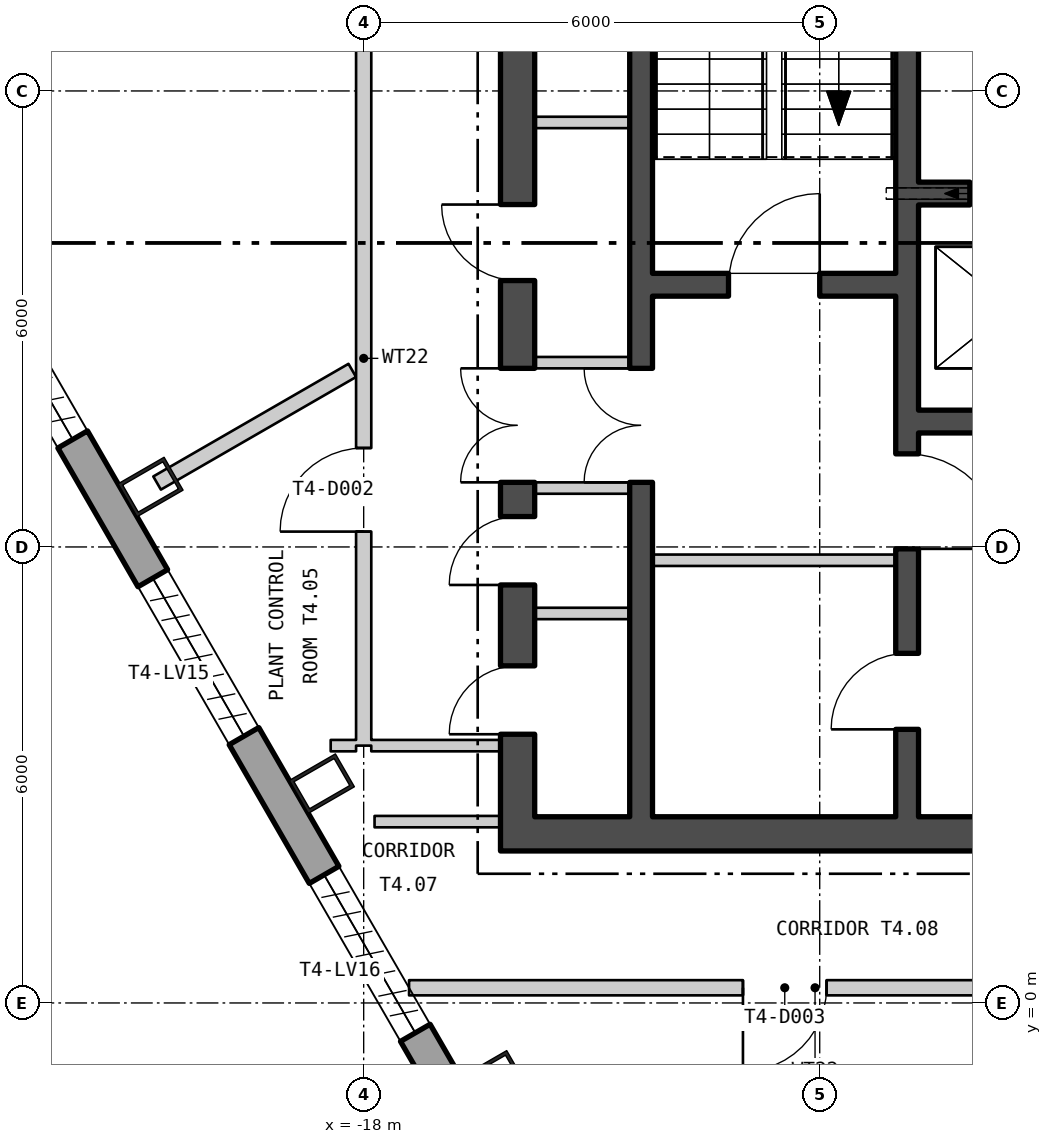
"""IFC4 building model, lengths in metres.
Left out: names, types, materials, properties, quantities, classifications, styles, units other than length and angle.
Written with IfcOpenShell. Run it as: python <this file> out.ifc"""

import sys

from ifc_helpers import new_model, si_unit, direction, frame, frame_2d, origin, origin_2d, place, context, subcontext, project, spatial, polyline, rectangle, hollow_rectangle, outline, extrude, element, fill, save


model = new_model("IFC4")
c1 = context("Model", 3, precision=1e-05, world=origin(), true_north=direction((0.0, 1.0)))
c2 = subcontext(c1, "Body", "Model", "MODEL_VIEW")
j1 = project(units=[si_unit("LENGTHUNIT", "METRE"), si_unit("PLANEANGLEUNIT", "RADIAN")], contexts=[c1])
p1 = place(None, origin())
s1 = spatial("IfcSite", under=j1, at=p1, CompositionType="ELEMENT")
p2 = place(p1, origin())
s2 = spatial("IfcBuilding", under=s1, at=p2, CompositionType="ELEMENT")
p3 = place(p2, frame((0.0, 0.0, 239.4)))
s3 = spatial("IfcBuildingStorey", under=s2, at=p3, CompositionType="ELEMENT", Elevation=239.4)
for number, where, z_axis, x_axis in (
    (1, (-20.804, 6.789, 0.0), (0.0, 0.0, 1.0), (0.5, -0.866, 0.0)),
    (2, (-18.55, 2.886, 0.0), (0.0, 0.0, 1.0), (0.5, -0.866, 0.0)),
    (3, (-16.296, -1.018, 0.0), (0.0, 0.0, 1.0), (0.5, -0.866, 0.0)),
):
    element("IfcColumn", number, at=place(p3, frame(where, z_axis=z_axis, x_axis=x_axis)), inside=s3, PredefinedType="COLUMN", context=c2, shape_type="SweptSolid", body=[
        extrude(hollow_rectangle(XDim=0.5, YDim=0.7, WallThickness=0.045, at=origin_2d()), origin(), (0.0, 0.0, 1.0), 6.0),
    ])
p4 = place(p3, frame((-25.975, 14.597, -0.18), z_axis=(0.0, 0.0, 1.0), x_axis=(0.499999764979, -0.866025539474, 0.0)))
e4 = element("IfcWall", 4, at=p4, inside=s3, PredefinedType="SOLIDWALL", context=c2, shape_type="SweptSolid", body=[
    extrude(outline(polyline([(-0.13, -0.225), (45.87, -0.225), (45.61, 0.225), (0.13, 0.225), (-0.13, -0.225)])), origin(), (0.0, 0.0, 1.0), 6.0),
])
p5 = place(p4, frame((1.424, 0.0, 1.38)))
e5 = element("IfcOpeningElement", 5, at=p5, cuts=e4, PredefinedType="OPENING", context=c2, shape_type="SweptSolid", body=[
    extrude(rectangle(XDim=2.4, YDim=3.6, at=frame_2d((1.2, 1.8))), frame((0.0, 0.235, 0.0), z_axis=(0.0, -1.0, 0.0), x_axis=(1.0, 0.0, 0.0)), (0.0, 0.0, 1.0), 0.47),
])
p6 = place(p4, frame((5.893, 0.0, 1.38)))
e6 = element("IfcOpeningElement", 6, at=p6, cuts=e4, PredefinedType="OPENING", context=c2, shape_type="SweptSolid", body=[
    extrude(rectangle(XDim=2.4, YDim=3.6, at=frame_2d((1.2, 1.8))), frame((0.0, 0.235, 0.0), z_axis=(0.0, -1.0, 0.0), x_axis=(1.0, 0.0, 0.0)), (0.0, 0.0, 1.0), 0.47),
])
p7 = place(p4, frame((10.401, 0.0, 1.38)))
e7 = element("IfcOpeningElement", 7, at=p7, cuts=e4, PredefinedType="OPENING", context=c2, shape_type="SweptSolid", body=[
    extrude(rectangle(XDim=2.4, YDim=3.6, at=frame_2d((1.2, 1.8))), frame((0.0, 0.235, 0.0), z_axis=(0.0, -1.0, 0.0), x_axis=(1.0, 0.0, 0.0)), (0.0, 0.0, 1.0), 0.47),
])
p8 = place(p4, frame((14.909, 0.0, 1.38)))
e8 = element("IfcOpeningElement", 8, at=p8, cuts=e4, PredefinedType="OPENING", context=c2, shape_type="SweptSolid", body=[
    extrude(rectangle(XDim=2.4, YDim=3.6, at=frame_2d((1.2, 1.8))), frame((0.0, 0.235, 0.0), z_axis=(0.0, -1.0, 0.0), x_axis=(1.0, 0.0, 0.0)), (0.0, 0.0, 1.0), 0.47),
])
p9 = place(p4, frame((19.416, 0.0, 1.38)))
e9 = element("IfcOpeningElement", 9, at=p9, cuts=e4, PredefinedType="OPENING", context=c2, shape_type="SweptSolid", body=[
    extrude(rectangle(XDim=2.4, YDim=3.6, at=frame_2d((1.2, 1.8))), frame((0.0, 0.235, 0.0), z_axis=(0.0, -1.0, 0.0), x_axis=(1.0, 0.0, 0.0)), (0.0, 0.0, 1.0), 0.47),
])
p10 = place(p4, frame((23.924, 0.0, 1.38)))
e10 = element("IfcOpeningElement", 10, at=p10, cuts=e4, PredefinedType="OPENING", context=c2, shape_type="SweptSolid", body=[
    extrude(rectangle(XDim=2.4, YDim=3.6, at=frame_2d((1.2, 1.8))), frame((0.0, 0.235, 0.0), z_axis=(0.0, -1.0, 0.0), x_axis=(1.0, 0.0, 0.0)), (0.0, 0.0, 1.0), 0.47),
])
p11 = place(p4, frame((28.431, 0.0, 1.38)))
e11 = element("IfcOpeningElement", 11, at=p11, cuts=e4, PredefinedType="OPENING", context=c2, shape_type="SweptSolid", body=[
    extrude(rectangle(XDim=2.4, YDim=3.6, at=frame_2d((1.2, 1.8))), frame((0.0, 0.235, 0.0), z_axis=(0.0, -1.0, 0.0), x_axis=(1.0, 0.0, 0.0)), (0.0, 0.0, 1.0), 0.47),
])
p12 = place(p4, frame((32.939, 0.0, 1.38)))
e12 = element("IfcOpeningElement", 12, at=p12, cuts=e4, PredefinedType="OPENING", context=c2, shape_type="SweptSolid", body=[
    extrude(rectangle(XDim=2.4, YDim=3.6, at=frame_2d((1.2, 1.8))), frame((0.0, 0.235, 0.0), z_axis=(0.0, -1.0, 0.0), x_axis=(1.0, 0.0, 0.0)), (0.0, 0.0, 1.0), 0.47),
])
p13 = place(p4, frame((37.447, 0.0, 1.38)))
e13 = element("IfcOpeningElement", 13, at=p13, cuts=e4, PredefinedType="OPENING", context=c2, shape_type="SweptSolid", body=[
    extrude(rectangle(XDim=2.4, YDim=3.6, at=frame_2d((1.2, 1.8))), frame((0.0, 0.235, 0.0), z_axis=(0.0, -1.0, 0.0), x_axis=(1.0, 0.0, 0.0)), (0.0, 0.0, 1.0), 0.47),
])
p14 = place(p4, frame((41.916, 0.0, 1.38)))
e14 = element("IfcOpeningElement", 14, at=p14, cuts=e4, PredefinedType="OPENING", context=c2, shape_type="SweptSolid", body=[
    extrude(rectangle(XDim=2.4, YDim=3.6, at=frame_2d((1.2, 1.8))), frame((0.0, 0.235, 0.0), z_axis=(0.0, -1.0, 0.0), x_axis=(1.0, 0.0, 0.0)), (0.0, 0.0, 1.0), 0.47),
])
p15 = place(p3, frame((-16.2, 2.225, 0.0), z_axis=(0.0, 0.0, 1.0), x_axis=(1.0, 0.0, 0.0)))
e15 = element("IfcWall", 15, at=p15, inside=s3, PredefinedType="SHEAR", context=c2, shape_type="SweptSolid", body=[
    extrude(rectangle(XDim=32.4, YDim=0.45, at=frame_2d((16.2, 0.0))), origin(), (0.0, 0.0, 1.0), 5.8),
])
p16 = place(p15, frame((10.7, 0.0, 0.0)))
e16 = element("IfcOpeningElement", 16, at=p16, cuts=e15, PredefinedType="OPENING", context=c2, shape_type="SweptSolid", body=[
    extrude(rectangle(XDim=1.8, YDim=2.4, at=frame_2d((0.9, 1.2))), frame((0.0, 0.235, 0.0), z_axis=(0.0, -1.0, 0.0), x_axis=(1.0, 0.0, 0.0)), (0.0, 0.0, 1.0), 0.47),
])
p17 = place(p15, frame((20.7, 0.0, 0.0)))
e17 = element("IfcOpeningElement", 17, at=p17, cuts=e15, PredefinedType="OPENING", context=c2, shape_type="SweptSolid", body=[
    extrude(rectangle(XDim=1.8, YDim=2.4, at=frame_2d((0.9, 1.2))), frame((0.0, 0.235, 0.0), z_axis=(0.0, -1.0, 0.0), x_axis=(1.0, 0.0, 0.0)), (0.0, 0.0, 1.0), 0.47),
])
p18 = place(p3, frame((-15.975, 2.45, 0.0), z_axis=(0.0, 0.0, 1.0), x_axis=(0.0, 1.0, 0.0)))
e18 = element("IfcWall", 18, at=p18, inside=s3, PredefinedType="SHEAR", context=c2, shape_type="SweptSolid", body=[
    extrude(rectangle(XDim=15.1, YDim=0.45, at=frame_2d((7.55, 0.0))), origin(), (0.0, 0.0, 1.0), 5.8),
])
p19 = place(p18, frame((4.4, 0.0, 0.0)))
e19 = element("IfcOpeningElement", 19, at=p19, cuts=e18, PredefinedType="OPENING", context=c2, shape_type="SweptSolid", body=[
    extrude(rectangle(XDim=1.5, YDim=2.1, at=frame_2d((0.75, 1.05))), frame((0.0, 0.235, 0.0), z_axis=(0.0, -1.0, 0.0), x_axis=(1.0, 0.0, 0.0)), (0.0, 0.0, 1.0), 0.47),
])
p20 = place(p18, frame((1.086, 0.0, 0.0)))
e20 = element("IfcOpeningElement", 20, at=p20, cuts=e18, PredefinedType="OPENING", context=c2, shape_type="SweptSolid", body=[
    extrude(rectangle(XDim=0.9, YDim=2.1, at=frame_2d((0.45, 1.05))), frame((0.0, 0.235, 0.0), z_axis=(0.0, -1.0, 0.0), x_axis=(1.0, 0.0, 0.0)), (0.0, 0.0, 1.0), 0.47),
])
p21 = place(p18, frame((3.05, 0.0, 0.0)))
e21 = element("IfcOpeningElement", 21, at=p21, cuts=e18, PredefinedType="OPENING", context=c2, shape_type="SweptSolid", body=[
    extrude(rectangle(XDim=0.9, YDim=2.1, at=frame_2d((0.45, 1.05))), frame((0.0, 0.235, 0.0), z_axis=(0.0, -1.0, 0.0), x_axis=(1.0, 0.0, 0.0)), (0.0, 0.0, 1.0), 0.47),
])
p22 = place(p18, frame((7.055, 0.0, 0.0)))
e22 = element("IfcOpeningElement", 22, at=p22, cuts=e18, PredefinedType="OPENING", context=c2, shape_type="SweptSolid", body=[
    extrude(rectangle(XDim=1.0, YDim=2.1, at=frame_2d((0.5, 1.05))), frame((0.0, 0.235, 0.0), z_axis=(0.0, -1.0, 0.0), x_axis=(1.0, 0.0, 0.0)), (0.0, 0.0, 1.0), 0.47),
])
p23 = place(p18, frame((11.705, 0.0, 0.0)))
e23 = element("IfcOpeningElement", 23, at=p23, cuts=e18, PredefinedType="OPENING", context=c2, shape_type="SweptSolid", body=[
    extrude(rectangle(XDim=0.9, YDim=2.1, at=frame_2d((0.45, 1.05))), frame((0.0, 0.235, 0.0), z_axis=(0.0, -1.0, 0.0), x_axis=(1.0, 0.0, 0.0)), (0.0, 0.0, 1.0), 0.47),
])
p24 = place(p3, frame((-10.85, 2.45, 0.0), z_axis=(0.0, 0.0, 1.0), x_axis=(0.0, 1.0, 0.0)))
e24 = element("IfcWall", 24, at=p24, inside=s3, PredefinedType="SHEAR", context=c2, shape_type="SweptSolid", body=[
    extrude(rectangle(XDim=15.1, YDim=0.3, at=frame_2d((7.55, 0.0))), origin(), (0.0, 0.0, 1.0), 5.8),
])
p25 = place(p24, frame((3.525, 0.0, 0.0)))
e25 = element("IfcOpeningElement", 25, at=p25, cuts=e24, PredefinedType="OPENING", context=c2, shape_type="SweptSolid", body=[
    extrude(rectangle(XDim=1.25, YDim=2.1, at=frame_2d((0.625, 1.05))), frame((0.0, 0.16, 0.0), z_axis=(0.0, -1.0, 0.0), x_axis=(1.0, 0.0, 0.0)), (0.0, 0.0, 1.0), 0.32),
])
p26 = place(p24, frame((1.15, 0.0, 0.0)))
e26 = element("IfcOpeningElement", 26, at=p26, cuts=e24, PredefinedType="OPENING", context=c2, shape_type="SweptSolid", body=[
    extrude(rectangle(XDim=1.0, YDim=2.1, at=frame_2d((0.5, 1.05))), frame((0.0, 0.16, 0.0), z_axis=(0.0, -1.0, 0.0), x_axis=(1.0, 0.0, 0.0)), (0.0, 0.0, 1.0), 0.32),
])
p27 = place(p3, frame((-14.35, 2.45, 0.0), z_axis=(0.0, 0.0, 1.0), x_axis=(0.0, 1.0, 0.0)))
e27 = element("IfcWall", 27, at=p27, inside=s3, PredefinedType="SHEAR", context=c2, shape_type="SweptSolid", body=[
    extrude(rectangle(XDim=15.1, YDim=0.3, at=frame_2d((7.55, 0.0))), origin(), (0.0, 0.0, 1.0), 5.8),
])
p28 = place(p27, frame((4.4, 0.0, 0.0)))
e28 = element("IfcOpeningElement", 28, at=p28, cuts=e27, PredefinedType="OPENING", context=c2, shape_type="SweptSolid", body=[
    extrude(rectangle(XDim=1.5, YDim=2.1, at=frame_2d((0.75, 1.05))), frame((0.0, 0.16, 0.0), z_axis=(0.0, -1.0, 0.0), x_axis=(1.0, 0.0, 0.0)), (0.0, 0.0, 1.0), 0.32),
])
p29 = place(p3, frame((-14.2, 9.45, 0.0), z_axis=(0.0, 0.0, 1.0), x_axis=(1.0, 0.0, 0.0)))
e29 = element("IfcWall", 29, at=p29, inside=s3, PredefinedType="SHEAR", context=c2, shape_type="SweptSolid", body=[
    extrude(rectangle(XDim=3.2, YDim=0.3, at=frame_2d((1.6, 0.0))), origin(), (0.0, 0.0, 1.0), 5.8),
])
p30 = place(p29, frame((1.0, 0.0, 0.0)))
e30 = element("IfcOpeningElement", 30, at=p30, cuts=e29, PredefinedType="OPENING", context=c2, shape_type="SweptSolid", body=[
    extrude(rectangle(XDim=1.2, YDim=2.1, at=frame_2d((0.6, 1.05))), frame((0.0, 0.16, 0.0), z_axis=(0.0, -1.0, 0.0), x_axis=(1.0, 0.0, 0.0)), (0.0, 0.0, 1.0), 0.32),
])
p31 = place(p3, frame((-10.7, 10.65, 0.0), z_axis=(0.0, 0.0, 1.0), x_axis=(1.0, 0.0, 0.0)))
e31 = element("IfcWall", 31, at=p31, inside=s3, PredefinedType="SHEAR", context=c2, shape_type="SweptSolid", body=[
    extrude(rectangle(XDim=10.3, YDim=0.3, at=frame_2d((5.15, 0.0))), origin(), (0.0, 0.0, 1.0), 5.8),
])
p32 = place(p31, frame((0.675, 0.0, 0.0)))
e32 = element("IfcOpeningElement", 32, at=p32, cuts=e31, PredefinedType="OPENING", context=c2, shape_type="SweptSolid", body=[
    extrude(rectangle(XDim=1.1, YDim=2.1, at=frame_2d((0.55, 1.05))), frame((0.0, 0.16, 0.0), z_axis=(0.0, -1.0, 0.0), x_axis=(1.0, 0.0, 0.0)), (0.0, 0.0, 1.0), 0.32),
])
p33 = place(p31, frame((3.275, 0.0, 0.0)))
e33 = element("IfcOpeningElement", 33, at=p33, cuts=e31, PredefinedType="OPENING", context=c2, shape_type="SweptSolid", body=[
    extrude(rectangle(XDim=1.1, YDim=2.1, at=frame_2d((0.55, 1.05))), frame((0.0, 0.16, 0.0), z_axis=(0.0, -1.0, 0.0), x_axis=(1.0, 0.0, 0.0)), (0.0, 0.0, 1.0), 0.32),
])
p34 = place(p31, frame((5.825, 0.0, 0.0)))
e34 = element("IfcOpeningElement", 34, at=p34, cuts=e31, PredefinedType="OPENING", context=c2, shape_type="SweptSolid", body=[
    extrude(rectangle(XDim=1.1, YDim=2.1, at=frame_2d((0.55, 1.05))), frame((0.0, 0.16, 0.0), z_axis=(0.0, -1.0, 0.0), x_axis=(1.0, 0.0, 0.0)), (0.0, 0.0, 1.0), 0.32),
])
p35 = place(p31, frame((8.425, 0.0, 0.0)))
e35 = element("IfcOpeningElement", 35, at=p35, cuts=e31, PredefinedType="OPENING", context=c2, shape_type="SweptSolid", body=[
    extrude(rectangle(XDim=1.0, YDim=2.1, at=frame_2d((0.5, 1.05))), frame((0.0, 0.16, 0.0), z_axis=(0.0, -1.0, 0.0), x_axis=(1.0, 0.0, 0.0)), (0.0, 0.0, 1.0), 0.32),
])
p36 = place(p3, frame((-10.7, 7.65, 0.0), z_axis=(0.0, 0.0, 1.0), x_axis=(1.0, 0.0, 0.0)))
e36 = element("IfcWall", 36, at=p36, inside=s3, PredefinedType="SHEAR", context=c2, shape_type="SweptSolid", body=[
    extrude(rectangle(XDim=10.3, YDim=0.3, at=frame_2d((5.15, 0.0))), origin(), (0.0, 0.0, 1.0), 5.8),
])
p37 = place(p3, frame((-14.2, 5.825, 0.0), z_axis=(0.0, 0.0, 1.0), x_axis=(1.0, 0.0, 0.0)))
e37 = element("IfcWall", 37, at=p37, inside=s3, PredefinedType="PARTITIONING", context=c2, shape_type="SweptSolid", body=[
    extrude(rectangle(XDim=3.2, YDim=0.15, at=frame_2d((1.6, 0.0))), origin(), (0.0, 0.0, 1.0), 5.8),
])
for number, where, z_axis, x_axis in (
    (38, (-15.75, 6.775, 0.0), (0.0, 0.0, 1.0), (1.0, 0.0, 0.0)),
    (39, (-15.75, 8.425, 0.0), (0.0, 0.0, 1.0), (1.0, 0.0, 0.0)),
    (40, (-15.75, 5.125, 0.0), (0.0, 0.0, 1.0), (1.0, 0.0, 0.0)),
    (41, (-15.75, 11.586, 0.0), (0.0, 0.0, 1.0), (1.0, 0.0, 0.0)),
):
    element("IfcWall", number, at=place(p3, frame(where, z_axis=z_axis, x_axis=x_axis)), inside=s3, PredefinedType="PARTITIONING", context=c2, shape_type="SweptSolid", body=[
        extrude(rectangle(XDim=1.25, YDim=0.15, at=frame_2d((0.625, 0.0))), origin(), (0.0, 0.0, 1.0), 5.8),
    ])
p38 = place(p3, frame((-20.718, 6.841, 0.0), z_axis=(0.0, 0.0, 1.0), x_axis=(0.866118198353, 0.499839240638, 0.0)))
e42 = element("IfcWall", 42, at=p38, inside=s3, PredefinedType="PARTITIONING", context=c2, shape_type="SweptSolid", body=[
    extrude(rectangle(XDim=2.965, YDim=0.2, at=frame_2d((1.482, 0.0))), origin(), (0.0, 0.0, 1.0), 5.8),
])
p39 = place(p3, frame((-18.434, 3.386, 0.0), z_axis=(0.0, 0.0, 1.0), x_axis=(1.0, 0.0, 0.0)))
e43 = element("IfcWall", 43, at=p39, inside=s3, PredefinedType="PARTITIONING", context=c2, shape_type="SweptSolid", body=[
    extrude(rectangle(XDim=0.334, YDim=0.15, at=frame_2d((0.167, 0.0))), origin(), (0.0, 0.0, 1.0), 5.8),
])
p40 = place(p3, frame((-18.0, 3.386, 0.0), z_axis=(0.0, 0.0, 1.0), x_axis=(0.0, 1.0, 0.0)))
e44 = element("IfcWall", 44, at=p40, inside=s3, PredefinedType="PARTITIONING", context=c2, shape_type="SweptSolid", body=[
    extrude(rectangle(XDim=10.191, YDim=0.2, at=frame_2d((5.096, 0.0))), origin(), (0.0, 0.0, 1.0), 5.8),
])
p41 = place(p40, frame((2.816, 0.0, 0.0)))
e45 = element("IfcOpeningElement", 45, at=p41, cuts=e44, PredefinedType="OPENING", context=c2, shape_type="SweptSolid", body=[
    extrude(rectangle(XDim=1.1, YDim=2.1, at=frame_2d((0.55, 1.05))), frame((0.0, 0.11, 0.0), z_axis=(0.0, -1.0, 0.0), x_axis=(1.0, 0.0, 0.0)), (0.0, 0.0, 1.0), 0.22),
])
p42 = place(p3, frame((-17.9, 3.386, 0.0), z_axis=(0.0, 0.0, 1.0), x_axis=(1.0, 0.0, 0.0)))
e46 = element("IfcWall", 46, at=p42, inside=s3, PredefinedType="PARTITIONING", context=c2, shape_type="SweptSolid", body=[
    extrude(rectangle(XDim=1.7, YDim=0.15, at=frame_2d((0.85, 0.0))), origin(), (0.0, 0.0, 1.0), 5.8),
])
p43 = place(p3, frame((-17.857, 2.386, 0.0), z_axis=(0.0, 0.0, 1.0), x_axis=(1.0, 0.0, 0.0)))
e47 = element("IfcWall", 47, at=p43, inside=s3, PredefinedType="PARTITIONING", context=c2, shape_type="SweptSolid", body=[
    extrude(rectangle(XDim=1.657, YDim=0.15, at=frame_2d((0.829, 0.0))), origin(), (0.0, 0.0, 1.0), 5.8),
])
p44 = place(p3, frame((-17.403, 0.2, 0.0), z_axis=(0.0, 0.0, 1.0), x_axis=(1.0, 0.0, 0.0)))
e48 = element("IfcWall", 48, at=p44, inside=s3, PredefinedType="PARTITIONING", context=c2, shape_type="SweptSolid", body=[
    extrude(rectangle(XDim=10.683, YDim=0.2, at=frame_2d((5.341, 0.0))), origin(), (0.0, 0.0, 1.0), 5.8),
])
p45 = place(p44, frame((4.393, 0.0, 0.0)))
e49 = element("IfcOpeningElement", 49, at=p45, cuts=e48, PredefinedType="OPENING", context=c2, shape_type="SweptSolid", body=[
    extrude(rectangle(XDim=1.1, YDim=2.1, at=frame_2d((0.55, 1.05))), frame((0.0, 0.11, 0.0), z_axis=(0.0, -1.0, 0.0), x_axis=(1.0, 0.0, 0.0)), (0.0, 0.0, 1.0), 0.22),
])
p46 = place(p3, frame((-13.956, -4.872, 0.0), z_axis=(0.0, 0.0, 1.0), x_axis=(0.866069187523, 0.499924156672, 0.0)))
e50 = element("IfcWall", 50, at=p46, inside=s3, PredefinedType="PARTITIONING", context=c2, shape_type="SweptSolid", body=[
    extrude(rectangle(XDim=8.297, YDim=0.2, at=frame_2d((4.149, 0.0))), origin(), (0.0, 0.0, 1.0), 5.8),
])
p47 = place(p32, origin())
e51 = element("IfcDoor", 51, at=p47, inside=s3, OperationType="SLIDING_TO_LEFT", PredefinedType="DOOR", context=c2, shape_type="SweptSolid", body=[
    extrude(rectangle(XDim=1.1, YDim=2.1, at=frame_2d((0.55, 1.05))), frame((0.0, 0.025, 0.0), z_axis=(0.0, -1.0, 0.0), x_axis=(1.0, 0.0, 0.0)), (0.0, 0.0, 1.0), 0.05),
])
fill(e32, e51)
p48 = place(p30, origin())
e52 = element("IfcDoor", 52, at=p48, inside=s3, OperationType="SINGLE_SWING_LEFT", PredefinedType="DOOR", context=c2, shape_type="SweptSolid", body=[
    extrude(rectangle(XDim=1.2, YDim=2.1, at=frame_2d((0.6, 1.05))), frame((0.0, 0.025, 0.0), z_axis=(0.0, -1.0, 0.0), x_axis=(1.0, 0.0, 0.0)), (0.0, 0.0, 1.0), 0.05),
])
fill(e30, e52)
p49 = place(p25, origin())
e53 = element("IfcDoor", 53, at=p49, inside=s3, OperationType="SINGLE_SWING_LEFT", PredefinedType="DOOR", context=c2, shape_type="SweptSolid", body=[
    extrude(rectangle(XDim=1.25, YDim=2.1, at=frame_2d((0.625, 1.05))), frame((0.0, 0.025, 0.0), z_axis=(0.0, -1.0, 0.0), x_axis=(1.0, 0.0, 0.0)), (0.0, 0.0, 1.0), 0.05),
])
fill(e25, e53)
p50 = place(p26, origin())
e54 = element("IfcDoor", 54, at=p50, inside=s3, OperationType="SINGLE_SWING_RIGHT", PredefinedType="DOOR", context=c2, shape_type="SweptSolid", body=[
    extrude(rectangle(XDim=1.0, YDim=2.1, at=frame_2d((0.5, 1.05))), frame((0.0, 0.025, 0.0), z_axis=(0.0, -1.0, 0.0), x_axis=(1.0, 0.0, 0.0)), (0.0, 0.0, 1.0), 0.05),
])
fill(e26, e54)
p51 = place(p28, origin())
e55 = element("IfcDoor", 55, at=p51, inside=s3, OperationType="DOUBLE_DOOR_SINGLE_SWING", PredefinedType="DOOR", context=c2, shape_type="SweptSolid", body=[
    extrude(rectangle(XDim=1.5, YDim=2.1, at=frame_2d((0.75, 1.05))), frame((0.0, 0.025, 0.0), z_axis=(0.0, -1.0, 0.0), x_axis=(1.0, 0.0, 0.0)), (0.0, 0.0, 1.0), 0.05),
])
fill(e28, e55)
p52 = place(p19, origin())
e56 = element("IfcDoor", 56, at=p52, inside=s3, OperationType="DOUBLE_DOOR_SINGLE_SWING", PredefinedType="DOOR", context=c2, shape_type="SweptSolid", body=[
    extrude(rectangle(XDim=1.5, YDim=2.1, at=frame_2d((0.75, 1.05))), frame((0.0, 0.025, 0.0), z_axis=(0.0, -1.0, 0.0), x_axis=(1.0, 0.0, 0.0)), (0.0, 0.0, 1.0), 0.05),
])
fill(e19, e56)
p53 = place(p20, origin())
e57 = element("IfcDoor", 57, at=p53, inside=s3, OperationType="SINGLE_SWING_RIGHT", PredefinedType="DOOR", context=c2, shape_type="SweptSolid", body=[
    extrude(rectangle(XDim=0.9, YDim=2.1, at=frame_2d((0.45, 1.05))), frame((0.0, 0.025, 0.0), z_axis=(0.0, -1.0, 0.0), x_axis=(1.0, 0.0, 0.0)), (0.0, 0.0, 1.0), 0.05),
])
fill(e20, e57)
p54 = place(p21, origin())
e58 = element("IfcDoor", 58, at=p54, inside=s3, OperationType="SINGLE_SWING_RIGHT", PredefinedType="DOOR", context=c2, shape_type="SweptSolid", body=[
    extrude(rectangle(XDim=0.9, YDim=2.1, at=frame_2d((0.45, 1.05))), frame((0.0, 0.025, 0.0), z_axis=(0.0, -1.0, 0.0), x_axis=(1.0, 0.0, 0.0)), (0.0, 0.0, 1.0), 0.05),
])
fill(e21, e58)
p55 = place(p22, origin())
e59 = element("IfcDoor", 59, at=p55, inside=s3, OperationType="SINGLE_SWING_LEFT", PredefinedType="DOOR", context=c2, shape_type="SweptSolid", body=[
    extrude(rectangle(XDim=1.0, YDim=2.1, at=frame_2d((0.5, 1.05))), frame((0.0, 0.025, 0.0), z_axis=(0.0, -1.0, 0.0), x_axis=(1.0, 0.0, 0.0)), (0.0, 0.0, 1.0), 0.05),
])
fill(e22, e59)
p56 = place(p41, origin())
e60 = element("IfcDoor", 60, at=p56, inside=s3, OperationType="SINGLE_SWING_RIGHT", PredefinedType="DOOR", context=c2, shape_type="SweptSolid", body=[
    extrude(rectangle(XDim=1.1, YDim=2.1, at=frame_2d((0.55, 1.05))), frame((0.0, 0.025, 0.0), z_axis=(0.0, -1.0, 0.0), x_axis=(1.0, 0.0, 0.0)), (0.0, 0.0, 1.0), 0.05),
])
fill(e45, e60)
p57 = place(p45, origin())
e61 = element("IfcDoor", 61, at=p57, inside=s3, OperationType="SINGLE_SWING_LEFT", PredefinedType="DOOR", context=c2, shape_type="SweptSolid", body=[
    extrude(rectangle(XDim=1.1, YDim=2.1, at=frame_2d((0.55, 1.05))), frame((0.0, 0.025, 0.0), z_axis=(0.0, -1.0, 0.0), x_axis=(1.0, 0.0, 0.0)), (0.0, 0.0, 1.0), 0.05),
])
fill(e49, e61)
save(model, sys.argv[1])
